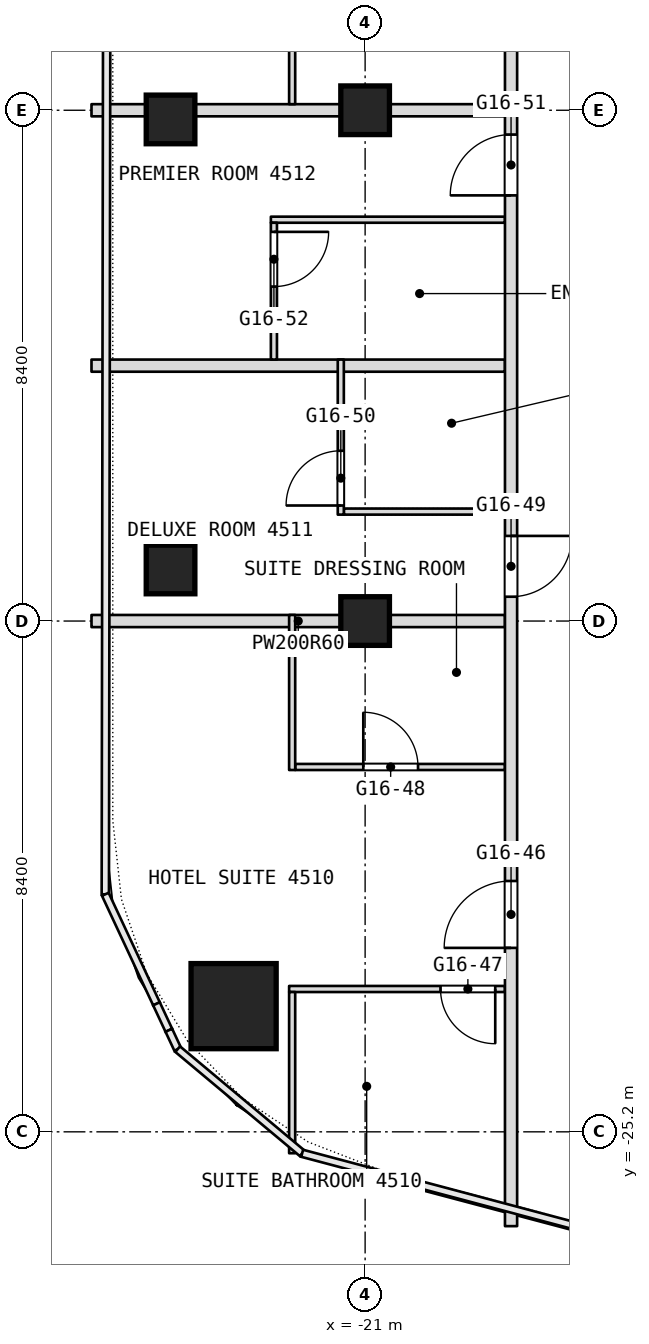
"""IFC4 building model, lengths in metres.
Left out: names, types, materials, properties, quantities, classifications, styles, units other than length and angle.
Written with IfcOpenShell. Run it as: python <this file> out.ifc"""

import sys

from ifc_helpers import new_model, si_unit, direction, frame, frame_2d, origin, origin_2d, place, context, subcontext, project, spatial, rectangle, extrude, element, fill, save


model = new_model("IFC4")
c1 = context("Model", 3, precision=1e-05, world=origin(), true_north=direction((0.0, 1.0)))
c2 = subcontext(c1, "Body", "Model", "MODEL_VIEW")
j1 = project(units=[si_unit("LENGTHUNIT", "METRE"), si_unit("PLANEANGLEUNIT", "RADIAN")], contexts=[c1])
p1 = place(None, origin())
s1 = spatial("IfcSite", under=j1, at=p1, CompositionType="ELEMENT")
p2 = place(p1, origin())
s2 = spatial("IfcBuilding", under=s1, at=p2, CompositionType="ELEMENT")
p3 = place(p2, frame((0.0, 0.0, 198.5)))
s3 = spatial("IfcBuildingStorey", under=s2, at=p3, CompositionType="ELEMENT", Elevation=198.5)
p4 = place(p3, frame((-23.163, -23.133, 0.0), z_axis=(0.0, 0.0, 1.0), x_axis=(1.0, 0.0, 0.0)))
e1 = element("IfcColumn", 1, at=p4, inside=s3, PredefinedType="COLUMN", context=c2, shape_type="SweptSolid", body=[
    extrude(rectangle(XDim=1.4, YDim=1.4, at=origin_2d()), origin(), (0.0, 0.0, 1.0), 3.6),
])
for number, where, z_axis, x_axis in (
    (2, (-21.0, -16.8, 0.0), (0.0, 0.0, 1.0), (1.0, 0.0, 0.0)),
    (3, (-21.0, -8.4, 0.0), (0.0, 0.0, 1.0), (1.0, 0.0, 0.0)),
    (4, (-24.2, -15.952, 0.0), (0.0, 0.0, 1.0), (1.0, 0.0, 0.0)),
    (5, (-24.2, -8.551, 0.0), (0.0, 0.0, 1.0), (1.0, 0.0, 0.0)),
):
    element("IfcColumn", number, at=place(p3, frame(where, z_axis=z_axis, x_axis=x_axis)), inside=s3, PredefinedType="COLUMN", context=c2, shape_type="SweptSolid", body=[
        extrude(rectangle(XDim=0.8, YDim=0.8, at=origin_2d()), origin(), (0.0, 0.0, 1.0), 3.6),
    ])
p5 = place(p3, frame((-22.25, -22.851, 0.0), z_axis=(0.0, 0.0, 1.0), x_axis=(1.0, 0.0, 0.0)))
e6 = element("IfcWall", 6, at=p5, inside=s3, PredefinedType="PARTITIONING", context=c2, shape_type="SweptSolid", body=[
    extrude(rectangle(XDim=3.55, YDim=0.1, at=frame_2d((1.775, 0.0))), origin(), (0.0, 0.0, 1.0), 3.34),
])
p6 = place(p5, frame((2.49, 0.0, 0.0)))
e7 = element("IfcOpeningElement", 7, at=p6, cuts=e6, PredefinedType="OPENING", context=c2, shape_type="SweptSolid", body=[
    extrude(rectangle(XDim=0.9, YDim=2.1, at=frame_2d((0.45, 1.05))), frame((0.0, 0.05, 0.0), z_axis=(0.0, -1.0, 0.0), x_axis=(1.0, 0.0, 0.0)), (0.0, 0.0, 1.0), 0.1),
])
p7 = place(p3, frame((-22.15, -19.2, 0.0), z_axis=(0.0, 0.0, 1.0), x_axis=(1.0, 0.0, 0.0)))
e8 = element("IfcWall", 8, at=p7, inside=s3, PredefinedType="PARTITIONING", context=c2, shape_type="SweptSolid", body=[
    extrude(rectangle(XDim=3.45, YDim=0.1, at=frame_2d((1.725, 0.0))), origin(), (0.0, 0.0, 1.0), 3.34),
])
p8 = place(p7, frame((1.12, 0.0, 0.0)))
e9 = element("IfcOpeningElement", 9, at=p8, cuts=e8, PredefinedType="OPENING", context=c2, shape_type="SweptSolid", body=[
    extrude(rectangle(XDim=0.9, YDim=2.1, at=frame_2d((0.45, 1.05))), frame((0.0, 0.05, 0.0), z_axis=(0.0, -1.0, 0.0), x_axis=(1.0, 0.0, 0.0)), (0.0, 0.0, 1.0), 0.1),
])
p9 = place(p3, frame((-25.5, -16.8, 0.0), z_axis=(0.0, 0.0, 1.0), x_axis=(1.0, 0.0, 0.0)))
e10 = element("IfcWall", 10, at=p9, inside=s3, PredefinedType="PARTITIONING", context=c2, shape_type="SweptSolid", body=[
    extrude(rectangle(XDim=6.8, YDim=0.2, at=frame_2d((3.4, 0.0))), origin(), (0.0, 0.0, 1.0), 2.94),
])
p10 = place(p3, frame((-21.35, -15.0, 0.0), z_axis=(0.0, 0.0, 1.0), x_axis=(1.0, 0.0, 0.0)))
e11 = element("IfcWall", 11, at=p10, inside=s3, PredefinedType="PARTITIONING", context=c2, shape_type="SweptSolid", body=[
    extrude(rectangle(XDim=2.65, YDim=0.1, at=frame_2d((1.325, 0.0))), origin(), (0.0, 0.0, 1.0), 3.34),
])
p11 = place(p3, frame((-25.5, -12.6, 0.0), z_axis=(0.0, 0.0, 1.0), x_axis=(1.0, 0.0, 0.0)))
e12 = element("IfcWall", 12, at=p11, inside=s3, PredefinedType="PARTITIONING", context=c2, shape_type="SweptSolid", body=[
    extrude(rectangle(XDim=6.8, YDim=0.2, at=frame_2d((3.4, 0.0))), origin(), (0.0, 0.0, 1.0), 3.34),
])
p12 = place(p3, frame((-22.55, -10.2, 0.0), z_axis=(0.0, 0.0, 1.0), x_axis=(1.0, 0.0, 0.0)))
e13 = element("IfcWall", 13, at=p12, inside=s3, PredefinedType="PARTITIONING", context=c2, shape_type="SweptSolid", body=[
    extrude(rectangle(XDim=3.85, YDim=0.1, at=frame_2d((1.925, 0.0))), origin(), (0.0, 0.0, 1.0), 3.34),
])
p13 = place(p3, frame((-25.5, -8.4, 0.0), z_axis=(0.0, 0.0, 1.0), x_axis=(1.0, 0.0, 0.0)))
e14 = element("IfcWall", 14, at=p13, inside=s3, PredefinedType="PARTITIONING", context=c2, shape_type="SweptSolid", body=[
    extrude(rectangle(XDim=6.8, YDim=0.2, at=frame_2d((3.4, 0.0))), origin(), (0.0, 0.0, 1.0), 2.94),
])
p14 = place(p3, frame((-18.6, -26.751, 0.0), z_axis=(0.0, 0.0, 1.0), x_axis=(0.0, 1.0, 0.0)))
e15 = element("IfcWall", 15, at=p14, inside=s3, PredefinedType="PARTITIONING", context=c2, shape_type="SweptSolid", body=[
    extrude(rectangle(XDim=49.091, YDim=0.2, at=frame_2d((24.545, 0.0))), origin(), (0.0, 0.0, 1.0), 3.34),
])
p15 = place(p14, frame((4.576, 0.0, 0.0)))
e16 = element("IfcOpeningElement", 16, at=p15, cuts=e15, PredefinedType="OPENING", context=c2, shape_type="SweptSolid", body=[
    extrude(rectangle(XDim=1.1, YDim=2.1, at=frame_2d((0.55, 1.05))), frame((0.0, 0.1, 0.0), z_axis=(0.0, -1.0, 0.0), x_axis=(1.0, 0.0, 0.0)), (0.0, 0.0, 1.0), 0.2),
])
p16 = place(p14, frame((10.351, 0.0, 0.0)))
e17 = element("IfcOpeningElement", 17, at=p16, cuts=e15, PredefinedType="OPENING", context=c2, shape_type="SweptSolid", body=[
    extrude(rectangle(XDim=1.0, YDim=2.1, at=frame_2d((0.5, 1.05))), frame((0.0, 0.1, 0.0), z_axis=(0.0, -1.0, 0.0), x_axis=(1.0, 0.0, 0.0)), (0.0, 0.0, 1.0), 0.2),
])
p17 = place(p14, frame((16.951, 0.0, 0.0)))
e18 = element("IfcOpeningElement", 18, at=p17, cuts=e15, PredefinedType="OPENING", context=c2, shape_type="SweptSolid", body=[
    extrude(rectangle(XDim=1.0, YDim=2.1, at=frame_2d((0.5, 1.05))), frame((0.0, 0.1, 0.0), z_axis=(0.0, -1.0, 0.0), x_axis=(1.0, 0.0, 0.0)), (0.0, 0.0, 1.0), 0.2),
])
p18 = place(p14, frame((22.051, 0.0, 0.0)))
e19 = element("IfcOpeningElement", 19, at=p18, cuts=e15, PredefinedType="OPENING", context=c2, shape_type="SweptSolid", body=[
    extrude(rectangle(XDim=1.1, YDim=2.1, at=frame_2d((0.55, 1.05))), frame((0.0, 0.1, 0.0), z_axis=(0.0, -1.0, 0.0), x_axis=(1.0, 0.0, 0.0)), (0.0, 0.0, 1.0), 0.2),
])
p19 = place(p14, frame((30.351, 0.0, 0.0)))
e20 = element("IfcOpeningElement", 20, at=p19, cuts=e15, PredefinedType="OPENING", context=c2, shape_type="SweptSolid", body=[
    extrude(rectangle(XDim=1.1, YDim=2.1, at=frame_2d((0.55, 1.05))), frame((0.0, 0.1, 0.0), z_axis=(0.0, -1.0, 0.0), x_axis=(1.0, 0.0, 0.0)), (0.0, 0.0, 1.0), 0.2),
])
p20 = place(p14, frame((40.901, 0.0, 0.0)))
e21 = element("IfcOpeningElement", 21, at=p20, cuts=e15, PredefinedType="OPENING", context=c2, shape_type="SweptSolid", body=[
    extrude(rectangle(XDim=1.1, YDim=2.1, at=frame_2d((0.55, 1.05))), frame((0.0, 0.1, 0.0), z_axis=(0.0, -1.0, 0.0), x_axis=(1.0, 0.0, 0.0)), (0.0, 0.0, 1.0), 0.2),
])
p21 = place(p14, frame((44.051, 0.0, 0.0)))
e22 = element("IfcOpeningElement", 22, at=p21, cuts=e15, PredefinedType="OPENING", context=c2, shape_type="SweptSolid", body=[
    extrude(rectangle(XDim=1.0, YDim=2.1, at=frame_2d((0.5, 1.05))), frame((0.0, 0.1, 0.0), z_axis=(0.0, -1.0, 0.0), x_axis=(1.0, 0.0, 0.0)), (0.0, 0.0, 1.0), 0.2),
])
p22 = place(p3, frame((-21.4, -15.05, 0.0), z_axis=(0.0, 0.0, 1.0), x_axis=(0.0, 1.0, 0.0)))
e23 = element("IfcWall", 23, at=p22, inside=s3, PredefinedType="PARTITIONING", context=c2, shape_type="SweptSolid", body=[
    extrude(rectangle(XDim=2.55, YDim=0.1, at=frame_2d((1.275, 0.0))), origin(), (0.0, 0.0, 1.0), 3.34),
])
p23 = place(p22, frame((0.15, 0.0, 0.0)))
e24 = element("IfcOpeningElement", 24, at=p23, cuts=e23, PredefinedType="OPENING", context=c2, shape_type="SweptSolid", body=[
    extrude(rectangle(XDim=0.9, YDim=2.1, at=frame_2d((0.45, 1.05))), frame((0.0, 0.05, 0.0), z_axis=(0.0, -1.0, 0.0), x_axis=(1.0, 0.0, 0.0)), (0.0, 0.0, 1.0), 0.1),
])
p24 = place(p3, frame((-22.2, -25.552, 0.0), z_axis=(0.0, 0.0, 1.0), x_axis=(0.0, 1.0, 0.0)))
e25 = element("IfcWall", 25, at=p24, inside=s3, PredefinedType="PARTITIONING", context=c2, shape_type="SweptSolid", body=[
    extrude(rectangle(XDim=2.651, YDim=0.1, at=frame_2d((1.326, 0.0))), origin(), (0.0, 0.0, 1.0), 3.34),
])
p25 = place(p3, frame((-22.2, -19.25, 0.0), z_axis=(0.0, 0.0, 1.0), x_axis=(0.0, 1.0, 0.0)))
e26 = element("IfcWall", 26, at=p25, inside=s3, PredefinedType="PARTITIONING", context=c2, shape_type="SweptSolid", body=[
    extrude(rectangle(XDim=2.55, YDim=0.1, at=frame_2d((1.275, 0.0))), origin(), (0.0, 0.0, 1.0), 3.34),
])
p26 = place(p3, frame((-22.2, -8.3, 0.0), z_axis=(0.0, 0.0, 1.0), x_axis=(0.0, 1.0, 0.0)))
e27 = element("IfcWall", 27, at=p26, inside=s3, PredefinedType="PARTITIONING", context=c2, shape_type="SweptSolid", body=[
    extrude(rectangle(XDim=3.45, YDim=0.1, at=frame_2d((1.725, 0.0))), origin(), (0.0, 0.0, 1.0), 3.34),
])
p27 = place(p26, frame((2.4, 0.0, 0.0)))
e28 = element("IfcOpeningElement", 28, at=p27, cuts=e27, PredefinedType="OPENING", context=c2, shape_type="SweptSolid", body=[
    extrude(rectangle(XDim=0.9, YDim=2.1, at=frame_2d((0.45, 1.05))), frame((0.0, 0.05, 0.0), z_axis=(0.0, -1.0, 0.0), x_axis=(1.0, 0.0, 0.0)), (0.0, 0.0, 1.0), 0.1),
])
p28 = place(p3, frame((-22.5, -12.5, 0.0), z_axis=(0.0, 0.0, 1.0), x_axis=(0.0, 1.0, 0.0)))
e29 = element("IfcWall", 29, at=p28, inside=s3, PredefinedType="PARTITIONING", context=c2, shape_type="SweptSolid", body=[
    extrude(rectangle(XDim=2.25, YDim=0.1, at=frame_2d((1.125, 0.0))), origin(), (0.0, 0.0, 1.0), 3.34),
])
p29 = place(p28, frame((1.2, 0.0, 0.0)))
e30 = element("IfcOpeningElement", 30, at=p29, cuts=e29, PredefinedType="OPENING", context=c2, shape_type="SweptSolid", body=[
    extrude(rectangle(XDim=0.9, YDim=2.1, at=frame_2d((0.45, 1.05))), frame((0.0, 0.05, 0.0), z_axis=(0.0, -1.0, 0.0), x_axis=(1.0, 0.0, 0.0)), (0.0, 0.0, 1.0), 0.1),
])
p30 = place(p6, origin())
e31 = element("IfcDoor", 31, at=p30, inside=s3, OperationType="SINGLE_SWING_LEFT", PredefinedType="DOOR", context=c2, shape_type="SweptSolid", body=[
    extrude(rectangle(XDim=0.9, YDim=2.1, at=frame_2d((0.45, 1.05))), frame((0.0, 0.025, 0.0), z_axis=(0.0, -1.0, 0.0), x_axis=(1.0, 0.0, 0.0)), (0.0, 0.0, 1.0), 0.05),
])
fill(e7, e31)
p31 = place(p8, origin())
e32 = element("IfcDoor", 32, at=p31, inside=s3, OperationType="SINGLE_SWING_LEFT", PredefinedType="DOOR", context=c2, shape_type="SweptSolid", body=[
    extrude(rectangle(XDim=0.9, YDim=2.1, at=frame_2d((0.45, 1.05))), frame((0.0, 0.025, 0.0), z_axis=(0.0, -1.0, 0.0), x_axis=(1.0, 0.0, 0.0)), (0.0, 0.0, 1.0), 0.05),
])
fill(e9, e32)
p32 = place(p15, origin())
e33 = element("IfcDoor", 33, at=p32, inside=s3, OperationType="SINGLE_SWING_LEFT", PredefinedType="DOOR", context=c2, shape_type="SweptSolid", body=[
    extrude(rectangle(XDim=1.1, YDim=2.1, at=frame_2d((0.55, 1.05))), frame((0.0, 0.025, 0.0), z_axis=(0.0, -1.0, 0.0), x_axis=(1.0, 0.0, 0.0)), (0.0, 0.0, 1.0), 0.05),
])
fill(e16, e33)
p33 = place(p16, origin())
e34 = element("IfcDoor", 34, at=p33, inside=s3, OperationType="SINGLE_SWING_RIGHT", PredefinedType="DOOR", context=c2, shape_type="SweptSolid", body=[
    extrude(rectangle(XDim=1.0, YDim=2.1, at=frame_2d((0.5, 1.05))), frame((0.0, 0.025, 0.0), z_axis=(0.0, -1.0, 0.0), x_axis=(1.0, 0.0, 0.0)), (0.0, 0.0, 1.0), 0.05),
])
fill(e17, e34)
p34 = place(p17, origin())
e35 = element("IfcDoor", 35, at=p34, inside=s3, OperationType="SINGLE_SWING_RIGHT", PredefinedType="DOOR", context=c2, shape_type="SweptSolid", body=[
    extrude(rectangle(XDim=1.0, YDim=2.1, at=frame_2d((0.5, 1.05))), frame((0.0, 0.025, 0.0), z_axis=(0.0, -1.0, 0.0), x_axis=(1.0, 0.0, 0.0)), (0.0, 0.0, 1.0), 0.05),
])
fill(e18, e35)
p35 = place(p23, origin())
e36 = element("IfcDoor", 36, at=p35, inside=s3, OperationType="SINGLE_SWING_RIGHT", PredefinedType="DOOR", context=c2, shape_type="SweptSolid", body=[
    extrude(rectangle(XDim=0.9, YDim=2.1, at=frame_2d((0.45, 1.05))), frame((0.0, 0.025, 0.0), z_axis=(0.0, -1.0, 0.0), x_axis=(1.0, 0.0, 0.0)), (0.0, 0.0, 1.0), 0.05),
])
fill(e24, e36)
p36 = place(p29, origin())
e37 = element("IfcDoor", 37, at=p36, inside=s3, OperationType="SINGLE_SWING_LEFT", PredefinedType="DOOR", context=c2, shape_type="SweptSolid", body=[
    extrude(rectangle(XDim=0.9, YDim=2.1, at=frame_2d((0.45, 1.05))), frame((0.0, 0.025, 0.0), z_axis=(0.0, -1.0, 0.0), x_axis=(1.0, 0.0, 0.0)), (0.0, 0.0, 1.0), 0.05),
])
fill(e30, e37)
save(model, sys.argv[1])
